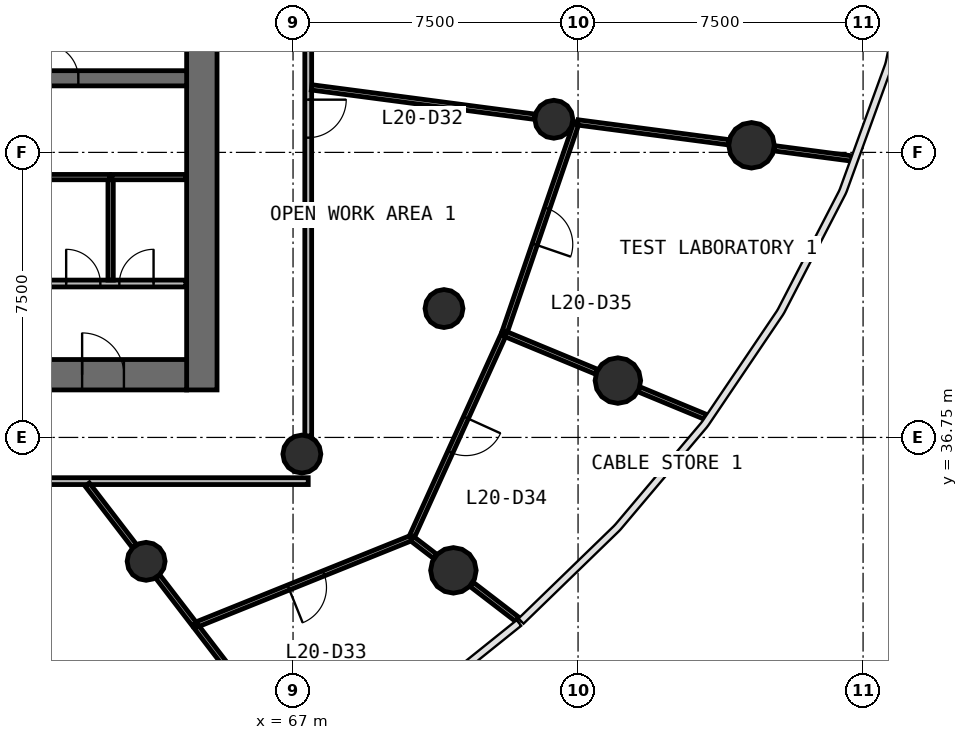
"""IFC4 building model, lengths in metres.
Left out: names, types, materials, properties, quantities, classifications, styles, units other than length and angle.
Written with IfcOpenShell. Run it as: python <this file> out.ifc"""

import sys

from ifc_helpers import new_model, si_unit, direction, frame, frame_2d, origin, origin_2d, place, context, subcontext, project, spatial, rectangle, circle, extrude, source, transform, mapped, element, fill, save


model = new_model("IFC4")
c1 = context("Model", 3, precision=1e-05, world=origin(), true_north=direction((0.0, 1.0)))
c2 = subcontext(c1, "Body", "Model", "MODEL_VIEW")
j1 = project(units=[si_unit("LENGTHUNIT", "METRE"), si_unit("PLANEANGLEUNIT", "RADIAN")], contexts=[c1])
p1 = place(None, origin())
s1 = spatial("IfcSite", under=j1, at=p1, CompositionType="ELEMENT")
p2 = place(p1, origin())
s2 = spatial("IfcBuilding", under=s1, at=p2, CompositionType="ELEMENT")
p3 = place(p2, frame((0.0, 0.0, 88.0)))
s3 = spatial("IfcBuildingStorey", under=s2, at=p3, CompositionType="ELEMENT", Elevation=88.0)
p4 = place(p3, frame((64.6, 38.0, 0.0), z_axis=(0.0, 0.0, 1.0), x_axis=(0.0, 1.0, 0.0)))
e1 = element("IfcWall", 1, at=p4, inside=s3, PredefinedType="SHEAR", context=c2, shape_type="SweptSolid", body=[
    extrude(rectangle(XDim=20.0, YDim=0.8, at=frame_2d((10.0, 0.0))), origin(), (0.0, 0.0, 1.0), 4.1),
])
p5 = place(p4, frame((9.1, 0.0, 0.0)))
e2 = element("IfcOpeningElement", 2, at=p5, cuts=e1, PredefinedType="OPENING", context=c2, shape_type="SweptSolid", body=[
    extrude(rectangle(XDim=1.8, YDim=2.1, at=frame_2d((0.9, 1.05))), frame((0.0, 0.41, 0.0), z_axis=(0.0, -1.0, 0.0), x_axis=(1.0, 0.0, 0.0)), (0.0, 0.0, 1.0), 0.82),
])
p6 = place(p3, frame((39.8, 38.4, 0.0), z_axis=(0.0, 0.0, 1.0), x_axis=(1.0, 0.0, 0.0)))
e3 = element("IfcWall", 3, at=p6, inside=s3, PredefinedType="SHEAR", context=c2, shape_type="SweptSolid", body=[
    extrude(rectangle(XDim=24.4, YDim=0.8, at=frame_2d((12.2, 0.0))), origin(), (0.0, 0.0, 1.0), 4.1),
])
p7 = place(p6, frame((21.65, 0.0, 0.0)))
e4 = element("IfcOpeningElement", 4, at=p7, cuts=e3, PredefinedType="OPENING", context=c2, shape_type="SweptSolid", body=[
    extrude(rectangle(XDim=1.1, YDim=2.1, at=frame_2d((0.55, 1.05))), frame((0.0, 0.41, 0.0), z_axis=(0.0, -1.0, 0.0), x_axis=(1.0, 0.0, 0.0)), (0.0, 0.0, 1.0), 0.82),
])
p8 = place(p6, frame((2.15, 0.0, 0.0)))
e5 = element("IfcOpeningElement", 5, at=p8, cuts=e3, PredefinedType="OPENING", context=c2, shape_type="SweptSolid", body=[
    extrude(rectangle(XDim=1.1, YDim=2.1, at=frame_2d((0.55, 1.05))), frame((0.0, 0.41, 0.0), z_axis=(0.0, -1.0, 0.0), x_axis=(1.0, 0.0, 0.0)), (0.0, 0.0, 1.0), 0.82),
])
p9 = place(p3, frame((39.8, 46.2, 0.0), z_axis=(0.0, 0.0, 1.0), x_axis=(1.0, 0.0, 0.0)))
e6 = element("IfcWall", 6, at=p9, inside=s3, PredefinedType="SHEAR", context=c2, shape_type="SweptSolid", body=[
    extrude(rectangle(XDim=24.4, YDim=0.4, at=frame_2d((12.2, 0.0))), origin(), (0.0, 0.0, 1.0), 4.1),
])
p10 = place(p9, frame((4.7, 0.0, 0.0)))
e7 = element("IfcOpeningElement", 7, at=p10, cuts=e6, PredefinedType="OPENING", context=c2, shape_type="SweptSolid", body=[
    extrude(rectangle(XDim=1.1, YDim=2.1, at=frame_2d((0.55, 1.05))), frame((0.0, 0.21, 0.0), z_axis=(0.0, -1.0, 0.0), x_axis=(1.0, 0.0, 0.0)), (0.0, 0.0, 1.0), 0.42),
])
p11 = place(p9, frame((7.2, 0.0, 0.0)))
e8 = element("IfcOpeningElement", 8, at=p11, cuts=e6, PredefinedType="OPENING", context=c2, shape_type="SweptSolid", body=[
    extrude(rectangle(XDim=1.1, YDim=2.1, at=frame_2d((0.55, 1.05))), frame((0.0, 0.21, 0.0), z_axis=(0.0, -1.0, 0.0), x_axis=(1.0, 0.0, 0.0)), (0.0, 0.0, 1.0), 0.42),
])
p12 = place(p9, frame((9.7, 0.0, 0.0)))
e9 = element("IfcOpeningElement", 9, at=p12, cuts=e6, PredefinedType="OPENING", context=c2, shape_type="SweptSolid", body=[
    extrude(rectangle(XDim=1.1, YDim=2.1, at=frame_2d((0.55, 1.05))), frame((0.0, 0.21, 0.0), z_axis=(0.0, -1.0, 0.0), x_axis=(1.0, 0.0, 0.0)), (0.0, 0.0, 1.0), 0.42),
])
p13 = place(p9, frame((20.65, 0.0, 0.0)))
e10 = element("IfcOpeningElement", 10, at=p13, cuts=e6, PredefinedType="OPENING", context=c2, shape_type="SweptSolid", body=[
    extrude(rectangle(XDim=0.9, YDim=2.1, at=frame_2d((0.45, 1.05))), frame((0.0, 0.21, 0.0), z_axis=(0.0, -1.0, 0.0), x_axis=(1.0, 0.0, 0.0)), (0.0, 0.0, 1.0), 0.42),
])
p14 = place(p9, frame((2.85, 0.0, 0.0)))
e11 = element("IfcOpeningElement", 11, at=p14, cuts=e6, PredefinedType="OPENING", context=c2, shape_type="SweptSolid", body=[
    extrude(rectangle(XDim=0.9, YDim=2.1, at=frame_2d((0.45, 1.05))), frame((0.0, 0.21, 0.0), z_axis=(0.0, -1.0, 0.0), x_axis=(1.0, 0.0, 0.0)), (0.0, 0.0, 1.0), 0.42),
])
p15 = place(p9, frame((11.85, 0.0, 0.0)))
e12 = element("IfcOpeningElement", 12, at=p15, cuts=e6, PredefinedType="OPENING", context=c2, shape_type="SweptSolid", body=[
    extrude(rectangle(XDim=0.9, YDim=2.1, at=frame_2d((0.45, 1.05))), frame((0.0, 0.21, 0.0), z_axis=(0.0, -1.0, 0.0), x_axis=(1.0, 0.0, 0.0)), (0.0, 0.0, 1.0), 0.42),
])
m1 = source(origin(), c2, "Body", "SweptSolid", [
    extrude(circle(Radius=0.6, at=origin_2d()), origin(), (0.0, 0.0, 1.0), 4.1),
])
for number, where, z_axis, x_axis in (
    (13, (71.22, 33.252, 0.0), (0.0, 0.0, 1.0), (1.0, 0.0, 0.0)),
    (14, (75.548, 38.246, 0.0), (0.0, 0.0, 1.0), (1.0, 0.0, 0.0)),
    (15, (79.064, 44.437, 0.0), (0.0, 0.0, 1.0), (1.0, 0.0, 0.0)),
):
    element("IfcColumn", number, at=place(p3, frame(where, z_axis=z_axis, x_axis=x_axis)), inside=s3, PredefinedType="COLUMN", context=c2, shape_type="MappedRepresentation", body=[
        mapped(m1, transform((0.0, 0.0, 0.0), scale=1.0)),
    ])
m2 = source(origin(), c2, "Body", "SweptSolid", [
    extrude(circle(Radius=0.5, at=origin_2d()), origin(), (0.0, 0.0, 1.0), 4.1),
])
for number, where, z_axis, x_axis in (
    (16, (63.134, 33.49, 0.0), (0.0, 0.0, 1.0), (1.0, 0.0, 0.0)),
    (17, (67.232, 36.312, 0.0), (0.0, 0.0, 1.0), (1.0, 0.0, 0.0)),
    (18, (70.972, 40.141, 0.0), (0.0, 0.0, 1.0), (1.0, 0.0, 0.0)),
    (19, (73.863, 45.122, 0.0), (0.0, 0.0, 1.0), (1.0, 0.0, 0.0)),
):
    element("IfcColumn", number, at=place(p3, frame(where, z_axis=z_axis, x_axis=x_axis)), inside=s3, PredefinedType="COLUMN", context=c2, shape_type="MappedRepresentation", body=[
        mapped(m2, transform((0.0, 0.0, 0.0), scale=1.0)),
    ])
p16 = place(p3, frame((67.4, 35.6, 0.0), z_axis=(0.0, 0.0, 1.0), x_axis=(-1.0, 0.0, 0.0)))
e20 = element("IfcWall", 20, at=p16, inside=s3, PredefinedType="PARTITIONING", context=c2, shape_type="SweptSolid", body=[
    extrude(rectangle(XDim=30.8, YDim=0.18, at=frame_2d((15.4, 0.0))), origin(), (0.0, 0.0, 1.0), 2.9),
])
p17 = place(p16, frame((22.25, 0.0, 0.0)))
e21 = element("IfcOpeningElement", 21, at=p17, cuts=e20, PredefinedType="OPENING", context=c2, shape_type="SweptSolid", body=[
    extrude(rectangle(XDim=0.9, YDim=2.1, at=frame_2d((0.45, 1.05))), frame((0.0, 0.1, 0.0), z_axis=(0.0, -1.0, 0.0), x_axis=(1.0, 0.0, 0.0)), (0.0, 0.0, 1.0), 0.2),
])
p18 = place(p16, frame((19.65, 0.0, 0.0)))
e22 = element("IfcOpeningElement", 22, at=p18, cuts=e20, PredefinedType="OPENING", context=c2, shape_type="SweptSolid", body=[
    extrude(rectangle(XDim=0.9, YDim=2.1, at=frame_2d((0.45, 1.05))), frame((0.0, 0.1, 0.0), z_axis=(0.0, -1.0, 0.0), x_axis=(1.0, 0.0, 0.0)), (0.0, 0.0, 1.0), 0.2),
])
p19 = place(p16, frame((17.25, 0.0, 0.0)))
e23 = element("IfcOpeningElement", 23, at=p19, cuts=e20, PredefinedType="OPENING", context=c2, shape_type="SweptSolid", body=[
    extrude(rectangle(XDim=0.9, YDim=2.1, at=frame_2d((0.45, 1.05))), frame((0.0, 0.1, 0.0), z_axis=(0.0, -1.0, 0.0), x_axis=(1.0, 0.0, 0.0)), (0.0, 0.0, 1.0), 0.2),
])
p20 = place(p16, frame((14.95, 0.0, 0.0)))
e24 = element("IfcOpeningElement", 24, at=p20, cuts=e20, PredefinedType="OPENING", context=c2, shape_type="SweptSolid", body=[
    extrude(rectangle(XDim=1.0, YDim=2.1, at=frame_2d((0.5, 1.05))), frame((0.0, 0.1, 0.0), z_axis=(0.0, -1.0, 0.0), x_axis=(1.0, 0.0, 0.0)), (0.0, 0.0, 1.0), 0.2),
])
p21 = place(p3, frame((67.4, 60.37, 0.0), z_axis=(0.0, 0.0, 1.0), x_axis=(0.0, -1.0, 0.0)))
e25 = element("IfcWall", 25, at=p21, inside=s3, PredefinedType="PARTITIONING", context=c2, shape_type="SweptSolid", body=[
    extrude(rectangle(XDim=23.583, YDim=0.18, at=frame_2d((11.791, 0.0))), origin(), (0.0, 0.0, 1.0), 2.9),
])
p22 = place(p21, frame((14.732, 0.0, 0.0)))
e26 = element("IfcOpeningElement", 26, at=p22, cuts=e25, PredefinedType="OPENING", context=c2, shape_type="SweptSolid", body=[
    extrude(rectangle(XDim=1.0, YDim=2.1, at=frame_2d((0.5, 1.05))), frame((0.0, 0.1, 0.0), z_axis=(0.0, -1.0, 0.0), x_axis=(1.0, 0.0, 0.0)), (0.0, 0.0, 1.0), 0.2),
])
p23 = place(p21, frame((11.333, 0.0, 0.0)))
e27 = element("IfcOpeningElement", 27, at=p23, cuts=e25, PredefinedType="OPENING", context=c2, shape_type="SweptSolid", body=[
    extrude(rectangle(XDim=1.0, YDim=2.1, at=frame_2d((0.5, 1.05))), frame((0.0, 0.1, 0.0), z_axis=(0.0, -1.0, 0.0), x_axis=(1.0, 0.0, 0.0)), (0.0, 0.0, 1.0), 0.2),
])
p24 = place(p3, frame((60.23, 40.8, 0.0), z_axis=(0.0, 0.0, 1.0), x_axis=(1.0, 0.0, 0.0)))
e28 = element("IfcWall", 28, at=p24, inside=s3, PredefinedType="PARTITIONING", context=c2, shape_type="SweptSolid", body=[
    extrude(rectangle(XDim=3.95, YDim=0.18, at=frame_2d((1.975, 0.0))), origin(), (0.0, 0.0, 1.0), 3.7),
])
p25 = place(p24, frame((0.8, 0.0, 0.0)))
e29 = element("IfcOpeningElement", 29, at=p25, cuts=e28, PredefinedType="OPENING", context=c2, shape_type="SweptSolid", body=[
    extrude(rectangle(XDim=0.9, YDim=2.1, at=frame_2d((0.45, 1.05))), frame((0.0, 0.1, 0.0), z_axis=(0.0, -1.0, 0.0), x_axis=(1.0, 0.0, 0.0)), (0.0, 0.0, 1.0), 0.2),
])
p26 = place(p24, frame((2.2, 0.0, 0.0)))
e30 = element("IfcOpeningElement", 30, at=p26, cuts=e28, PredefinedType="OPENING", context=c2, shape_type="SweptSolid", body=[
    extrude(rectangle(XDim=0.9, YDim=2.1, at=frame_2d((0.45, 1.05))), frame((0.0, 0.1, 0.0), z_axis=(0.0, -1.0, 0.0), x_axis=(1.0, 0.0, 0.0)), (0.0, 0.0, 1.0), 0.2),
])
p27 = place(p3, frame((70.111, 34.103, 0.0), z_axis=(0.0, 0.0, 1.0), x_axis=(-0.927526515491, -0.373757358538, 0.0)))
e31 = element("IfcWall", 31, at=p27, inside=s3, PredefinedType="PARTITIONING", context=c2, shape_type="SweptSolid", body=[
    extrude(rectangle(XDim=6.133, YDim=0.14, at=frame_2d((3.066, 0.0))), origin(), (0.0, 0.0, 1.0), 2.9),
])
p28 = place(p27, frame((2.483, 0.0, 0.0)))
e32 = element("IfcOpeningElement", 32, at=p28, cuts=e31, PredefinedType="OPENING", context=c2, shape_type="SweptSolid", body=[
    extrude(rectangle(XDim=1.0, YDim=2.1, at=frame_2d((0.5, 1.05))), frame((0.0, 0.08, 0.0), z_axis=(0.0, -1.0, 0.0), x_axis=(1.0, 0.0, 0.0)), (0.0, 0.0, 1.0), 0.16),
])
p29 = place(p3, frame((67.49, 45.961, 0.0), z_axis=(0.0, 0.0, 1.0), x_axis=(0.991445034615, -0.130524876315, 0.0)))
e33 = element("IfcWall", 33, at=p29, inside=s3, PredefinedType="PARTITIONING", context=c2, shape_type="SweptSolid", body=[
    extrude(rectangle(XDim=5.924, YDim=0.14, at=frame_2d((2.962, 0.0))), origin(), (0.0, 0.0, 1.0), 2.9),
])
p30 = place(p3, frame((72.555, 39.486, 0.0), z_axis=(0.0, 0.0, 1.0), x_axis=(-0.413427624121, -0.91053698421, 0.0)))
e34 = element("IfcWall", 34, at=p30, inside=s3, PredefinedType="PARTITIONING", context=c2, shape_type="SweptSolid", body=[
    extrude(rectangle(XDim=5.882, YDim=0.14, at=frame_2d((2.941, 0.0))), origin(), (0.0, 0.0, 1.0), 2.9),
])
p31 = place(p30, frame((2.432, 0.0, 0.0)))
e35 = element("IfcOpeningElement", 35, at=p31, cuts=e34, PredefinedType="OPENING", context=c2, shape_type="SweptSolid", body=[
    extrude(rectangle(XDim=1.0, YDim=2.1, at=frame_2d((0.5, 1.05))), frame((0.0, 0.08, 0.0), z_axis=(0.0, -1.0, 0.0), x_axis=(1.0, 0.0, 0.0)), (0.0, 0.0, 1.0), 0.16),
])
p32 = place(p3, frame((74.464, 45.042, 0.0), z_axis=(0.0, 0.0, 1.0), x_axis=(-0.324897670045, -0.94574917605, 0.0)))
e36 = element("IfcWall", 36, at=p32, inside=s3, PredefinedType="PARTITIONING", context=c2, shape_type="SweptSolid", body=[
    extrude(rectangle(XDim=5.845, YDim=0.14, at=frame_2d((2.923, 0.0))), origin(), (0.0, 0.0, 1.0), 2.9),
])
p33 = place(p32, frame((2.396, 0.0, 0.0)))
e37 = element("IfcOpeningElement", 37, at=p33, cuts=e36, PredefinedType="OPENING", context=c2, shape_type="SweptSolid", body=[
    extrude(rectangle(XDim=1.0, YDim=2.1, at=frame_2d((0.5, 1.05))), frame((0.0, 0.08, 0.0), z_axis=(0.0, -1.0, 0.0), x_axis=(1.0, 0.0, 0.0)), (0.0, 0.0, 1.0), 0.16),
])
p34 = place(p3, frame((74.494, 45.039, 0.0), z_axis=(0.0, 0.0, 1.0), x_axis=(0.991442675262, -0.130542796312, 0.0)))
e38 = element("IfcWall", 38, at=p34, inside=s3, PredefinedType="PARTITIONING", context=c2, shape_type="SweptSolid", body=[
    extrude(rectangle(XDim=4.006, YDim=0.14, at=frame_2d((2.003, 0.0))), origin(), (0.0, 0.0, 1.0), 2.9),
])
p35 = place(p3, frame((62.2, 40.89, 0.0), z_axis=(0.0, 0.0, 1.0), x_axis=(0.0, 1.0, 0.0)))
e39 = element("IfcWall", 39, at=p35, inside=s3, PredefinedType="PARTITIONING", context=c2, shape_type="SweptSolid", body=[
    extrude(rectangle(XDim=2.71, YDim=0.14, at=frame_2d((1.355, 0.0))), origin(), (0.0, 0.0, 1.0), 2.9),
])
p36 = place(p3, frame((72.583, 39.474, 0.0), z_axis=(0.0, 0.0, 1.0), x_axis=(0.923895733784, -0.382644316691, 0.0)))
e40 = element("IfcWall", 40, at=p36, inside=s3, PredefinedType="PARTITIONING", context=c2, shape_type="SweptSolid", body=[
    extrude(rectangle(XDim=2.604, YDim=0.14, at=frame_2d((1.302, 0.0))), origin(), (0.0, 0.0, 1.0), 2.9),
])
p37 = place(p3, frame((61.584, 35.51, 0.0), z_axis=(0.0, 0.0, 1.0), x_axis=(0.608727763541, -0.793379171578, 0.0)))
e41 = element("IfcWall", 41, at=p37, inside=s3, PredefinedType="PARTITIONING", context=c2, shape_type="SweptSolid", body=[
    extrude(rectangle(XDim=2.042, YDim=0.14, at=frame_2d((1.021, 0.0))), origin(), (0.0, 0.0, 1.0), 2.9),
])
p38 = place(p3, frame((64.467, 31.753, 0.0), z_axis=(0.0, 0.0, 1.0), x_axis=(0.608736894437, -0.793372165728, 0.0)))
e42 = element("IfcWall", 42, at=p38, inside=s3, PredefinedType="PARTITIONING", context=c2, shape_type="SweptSolid", body=[
    extrude(rectangle(XDim=1.964, YDim=0.14, at=frame_2d((0.982, 0.0))), origin(), (0.0, 0.0, 1.0), 2.9),
])
p39 = place(p3, frame((79.664, 44.358, 0.0), z_axis=(0.0, 0.0, 1.0), x_axis=(0.991451479475, -0.130475912903, 0.0)))
e43 = element("IfcWall", 43, at=p39, inside=s3, PredefinedType="PARTITIONING", context=c2, shape_type="SweptSolid", body=[
    extrude(rectangle(XDim=2.066, YDim=0.14, at=frame_2d((1.033, 0.0))), origin(), (0.0, 0.0, 1.0), 2.9),
])
p40 = place(p3, frame((60.23, 43.6, 0.0), z_axis=(0.0, 0.0, 1.0), x_axis=(1.0, 0.0, 0.0)))
e44 = element("IfcWall", 44, at=p40, inside=s3, PredefinedType="PARTITIONING", context=c2, shape_type="SweptSolid", body=[
    extrude(rectangle(XDim=1.94, YDim=0.14, at=frame_2d((0.97, 0.0))), origin(), (0.0, 0.0, 1.0), 2.9),
])
p41 = place(p3, frame((62.23, 43.6, 0.0), z_axis=(0.0, 0.0, 1.0), x_axis=(1.0, 0.0, 0.0)))
e45 = element("IfcWall", 45, at=p41, inside=s3, PredefinedType="PARTITIONING", context=c2, shape_type="SweptSolid", body=[
    extrude(rectangle(XDim=1.95, YDim=0.14, at=frame_2d((0.975, 0.0))), origin(), (0.0, 0.0, 1.0), 2.9),
])
p42 = place(p3, frame((76.107, 38.015, 0.0), z_axis=(0.0, 0.0, 1.0), x_axis=(0.923896609049, -0.382642203354, 0.0)))
e46 = element("IfcWall", 46, at=p42, inside=s3, PredefinedType="PARTITIONING", context=c2, shape_type="SweptSolid", body=[
    extrude(rectangle(XDim=1.881, YDim=0.14, at=frame_2d((0.94, 0.0))), origin(), (0.0, 0.0, 1.0), 2.9),
])
p43 = place(p3, frame((63.441, 33.09, 0.0), z_axis=(0.0, 0.0, 1.0), x_axis=(0.608800720532, -0.793323189299, 0.0)))
e47 = element("IfcWall", 47, at=p43, inside=s3, PredefinedType="PARTITIONING", context=c2, shape_type="SweptSolid", body=[
    extrude(rectangle(XDim=1.583, YDim=0.14, at=frame_2d((0.791, 0.0))), origin(), (0.0, 0.0, 1.0), 2.9),
])
p44 = place(p3, frame((71.699, 32.884, 0.0), z_axis=(0.0, 0.0, 1.0), x_axis=(0.793329378559, -0.608792655273, 0.0)))
e48 = element("IfcWall", 48, at=p44, inside=s3, PredefinedType="PARTITIONING", context=c2, shape_type="SweptSolid", body=[
    extrude(rectangle(XDim=1.504, YDim=0.14, at=frame_2d((0.752, 0.0))), origin(), (0.0, 0.0, 1.0), 2.9),
])
p45 = place(p3, frame((70.135, 34.085, 0.0), z_axis=(0.0, 0.0, 1.0), x_axis=(0.793348849006, -0.608767282121, 0.0)))
e49 = element("IfcWall", 49, at=p45, inside=s3, PredefinedType="PARTITIONING", context=c2, shape_type="SweptSolid", body=[
    extrude(rectangle(XDim=0.763, YDim=0.14, at=frame_2d((0.382, 0.0))), origin(), (0.0, 0.0, 1.0), 2.9),
])
m3 = source(origin(), c2, "Body", "SweptSolid", [
    extrude(rectangle(XDim=1.1, YDim=2.1, at=frame_2d((0.55, 1.05))), frame((0.0, 0.025, 0.0), z_axis=(0.0, -1.0, 0.0), x_axis=(1.0, 0.0, 0.0)), (0.0, 0.0, 1.0), 0.05),
])
p46 = place(p7, origin())
e50 = element("IfcDoor", 50, at=p46, inside=s3, OperationType="SINGLE_SWING_LEFT", PredefinedType="DOOR", context=c2, shape_type="MappedRepresentation", body=[
    mapped(m3, transform((0.0, 0.0, 0.0), scale=1.0)),
])
fill(e4, e50)
m4 = source(origin(), c2, "Body", "SweptSolid", [
    extrude(rectangle(XDim=1.0, YDim=2.1, at=frame_2d((0.5, 1.05))), frame((0.0, 0.025, 0.0), z_axis=(0.0, -1.0, 0.0), x_axis=(1.0, 0.0, 0.0)), (0.0, 0.0, 1.0), 0.05),
])
p47 = place(p22, origin())
e51 = element("IfcDoor", 51, at=p47, inside=s3, OperationType="SINGLE_SWING_LEFT", PredefinedType="DOOR", context=c2, shape_type="MappedRepresentation", body=[
    mapped(m4, transform((0.0, 0.0, 0.0), scale=1.0)),
])
fill(e26, e51)
p48 = place(p28, origin())
e52 = element("IfcDoor", 52, at=p48, inside=s3, OperationType="SINGLE_SWING_RIGHT", PredefinedType="DOOR", context=c2, shape_type="MappedRepresentation", body=[
    mapped(m4, transform((0.0, 0.0, 0.0), scale=1.0)),
])
fill(e32, e52)
p49 = place(p31, origin())
e53 = element("IfcDoor", 53, at=p49, inside=s3, OperationType="SINGLE_SWING_LEFT", PredefinedType="DOOR", context=c2, shape_type="MappedRepresentation", body=[
    mapped(m4, transform((0.0, 0.0, 0.0), scale=1.0)),
])
fill(e35, e53)
p50 = place(p33, origin())
e54 = element("IfcDoor", 54, at=p50, inside=s3, OperationType="SINGLE_SWING_RIGHT", PredefinedType="DOOR", context=c2, shape_type="MappedRepresentation", body=[
    mapped(m4, transform((0.0, 0.0, 0.0), scale=1.0)),
])
fill(e37, e54)
m5 = source(origin(), c2, "Body", "SweptSolid", [
    extrude(rectangle(XDim=0.9, YDim=2.1, at=frame_2d((0.45, 1.05))), frame((0.0, 0.025, 0.0), z_axis=(0.0, -1.0, 0.0), x_axis=(1.0, 0.0, 0.0)), (0.0, 0.0, 1.0), 0.05),
])
p51 = place(p13, origin())
e55 = element("IfcDoor", 55, at=p51, inside=s3, OperationType="SINGLE_SWING_LEFT", PredefinedType="DOOR", context=c2, shape_type="MappedRepresentation", body=[
    mapped(m5, transform((0.0, 0.0, 0.0), scale=1.0)),
])
fill(e10, e55)
p52 = place(p25, origin())
e56 = element("IfcDoor", 56, at=p52, inside=s3, OperationType="SINGLE_SWING_LEFT", PredefinedType="DOOR", context=c2, shape_type="MappedRepresentation", body=[
    mapped(m5, transform((0.0, 0.0, 0.0), scale=1.0)),
])
fill(e29, e56)
p53 = place(p26, origin())
e57 = element("IfcDoor", 57, at=p53, inside=s3, OperationType="SINGLE_SWING_RIGHT", PredefinedType="DOOR", context=c2, shape_type="MappedRepresentation", body=[
    mapped(m5, transform((0.0, 0.0, 0.0), scale=1.0)),
])
fill(e30, e57)
save(model, sys.argv[1])
